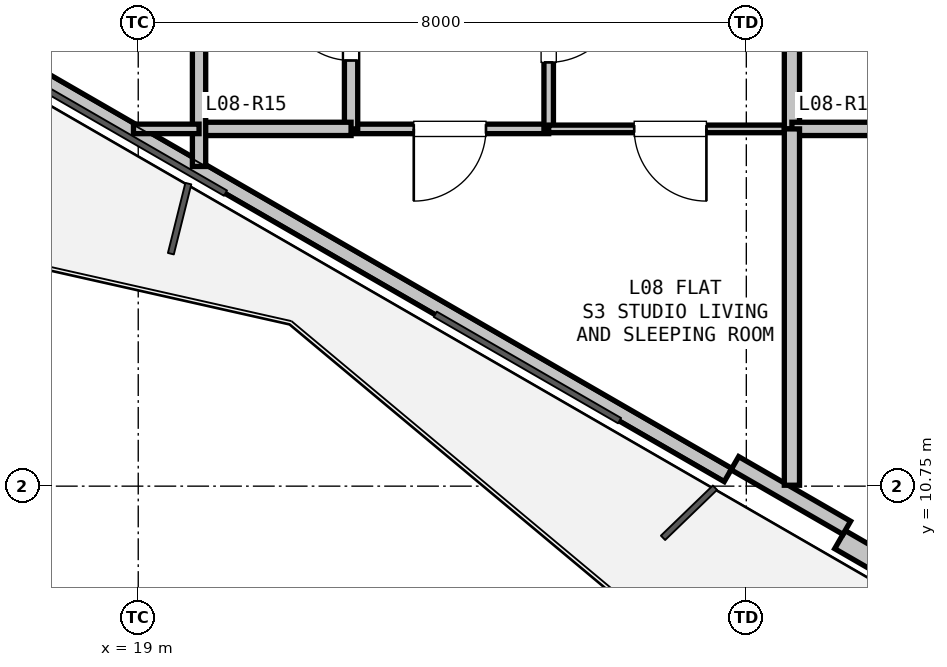
"""IFC4 building model, lengths in metres.
Left out: names, types, materials, properties, quantities, classifications, styles, units other than length and angle.
Written with IfcOpenShell. Run it as: python <this file> out.ifc"""

import sys

from ifc_helpers import new_model, si_unit, direction, frame, frame_2d, origin, place, context, subcontext, project, spatial, rectangle, extrude, element, fill, save


model = new_model("IFC4")
c1 = context("Model", 3, precision=1e-05, world=origin(), true_north=direction((0.0, 1.0)))
c2 = subcontext(c1, "Body", "Model", "MODEL_VIEW")
j1 = project(units=[si_unit("LENGTHUNIT", "METRE"), si_unit("PLANEANGLEUNIT", "RADIAN")], contexts=[c1])
p1 = place(None, origin())
s1 = spatial("IfcSite", under=j1, at=p1, CompositionType="ELEMENT")
p2 = place(p1, origin())
s2 = spatial("IfcBuilding", under=s1, at=p2, CompositionType="ELEMENT")
p3 = place(p2, frame((0.0, 0.0, 32.4)))
s3 = spatial("IfcBuildingStorey", under=s2, at=p3, CompositionType="ELEMENT", Elevation=32.4)
p4 = place(p3, frame((39.207, 3.71, 0.0), z_axis=(0.0, 0.0, 1.0), x_axis=(-0.86603192154, 0.499988710747, 0.0)))
e1 = element("IfcWall", 1, at=p4, inside=s3, PredefinedType="SOLIDWALL", context=c2, shape_type="SweptSolid", body=[
    extrude(rectangle(XDim=12.673, YDim=0.275, at=frame_2d((6.336, 0.0))), origin(), (0.0, 0.0, 1.0), 2.66),
])
p5 = place(p4, frame((8.136, 0.0, 0.0)))
e2 = element("IfcOpeningElement", 2, at=p5, cuts=e1, PredefinedType="OPENING", context=c2, shape_type="SweptSolid", body=[
    extrude(rectangle(XDim=1.1, YDim=2.1, at=frame_2d((0.55, 1.05))), frame((0.0, 0.147, 0.0), z_axis=(0.0, -1.0, 0.0), x_axis=(1.0, 0.0, 0.0)), (0.0, 0.0, 1.0), 0.295),
])
p6 = place(p4, frame((2.971, 0.0, 0.9)))
e3 = element("IfcOpeningElement", 3, at=p6, cuts=e1, PredefinedType="OPENING", context=c2, shape_type="SweptSolid", body=[
    extrude(rectangle(XDim=1.2, YDim=1.4, at=frame_2d((0.6, 0.7))), frame((0.0, 0.147, 0.0), z_axis=(0.0, -1.0, 0.0), x_axis=(1.0, 0.0, 0.0)), (0.0, 0.0, 1.0), 0.295),
])
p7 = place(p3, frame((26.76, 10.896, 0.0), z_axis=(0.0, 0.0, 1.0), x_axis=(-0.866027351828, 0.499996625875, 0.0)))
e4 = element("IfcWall", 4, at=p7, inside=s3, PredefinedType="PARAPET", context=c2, shape_type="SweptSolid", body=[
    extrude(rectangle(XDim=11.973, YDim=0.2, at=frame_2d((5.987, 0.0))), origin(), (0.0, 0.0, 1.0), 0.2),
])
p8 = place(p3, frame((28.322, 10.202, 0.0), z_axis=(0.0, 0.0, 1.0), x_axis=(-0.86605165483, 0.499954529098, 0.0)))
e5 = element("IfcWall", 5, at=p8, inside=s3, PredefinedType="PARAPET", context=c2, shape_type="SweptSolid", body=[
    extrude(rectangle(XDim=1.7, YDim=0.2, at=frame_2d((0.85, 0.0))), origin(), (0.0, 0.0, 1.0), 2.66),
])
p9 = place(p3, frame((24.4, 15.45, 0.0), z_axis=(0.0, 0.0, 1.0), x_axis=(-1.0, 0.0, 0.0)))
e6 = element("IfcWall", 6, at=p9, inside=s3, PredefinedType="PARTITIONING", context=c2, shape_type="SweptSolid", body=[
    extrude(rectangle(XDim=2.6, YDim=0.125, at=frame_2d((1.3, 0.0))), origin(), (0.0, 0.0, 1.0), 3.04),
])
p10 = place(p9, frame((0.825, 0.0, 0.0)))
e7 = element("IfcOpeningElement", 7, at=p10, cuts=e6, PredefinedType="OPENING", context=c2, shape_type="SweptSolid", body=[
    extrude(rectangle(XDim=0.95, YDim=2.1, at=frame_2d((0.475, 1.05))), frame((0.0, 0.073, 0.0), z_axis=(0.0, -1.0, 0.0), x_axis=(1.0, 0.0, 0.0)), (0.0, 0.0, 1.0), 0.145),
])
p11 = place(p3, frame((21.8, 15.45, 0.0), z_axis=(0.0, 0.0, 1.0), x_axis=(0.0, 1.0, 0.0)))
e8 = element("IfcWall", 8, at=p11, inside=s3, PredefinedType="PLUMBINGWALL", context=c2, shape_type="SweptSolid", body=[
    extrude(rectangle(XDim=2.7, YDim=0.175, at=frame_2d((1.35, 0.0))), origin(), (0.0, 0.0, 1.0), 3.04),
])
p12 = place(p11, frame((0.9, 0.0, 0.0)))
e9 = element("IfcOpeningElement", 9, at=p12, cuts=e8, PredefinedType="OPENING", context=c2, shape_type="SweptSolid", body=[
    extrude(rectangle(XDim=0.9, YDim=2.1, at=frame_2d((0.45, 1.05))), frame((0.0, 0.097, 0.0), z_axis=(0.0, -1.0, 0.0), x_axis=(1.0, 0.0, 0.0)), (0.0, 0.0, 1.0), 0.195),
])
p13 = place(p3, frame((24.4, 18.15, 0.0), z_axis=(0.0, 0.0, 1.0), x_axis=(0.0, -1.0, 0.0)))
e10 = element("IfcWall", 10, at=p13, inside=s3, PredefinedType="PARTITIONING", context=c2, shape_type="SweptSolid", body=[
    extrude(rectangle(XDim=2.7, YDim=0.125, at=frame_2d((1.35, 0.0))), origin(), (0.0, 0.0, 1.0), 2.338),
])
p14 = place(p13, frame((0.875, 0.0, 0.0)))
e11 = element("IfcOpeningElement", 11, at=p14, cuts=e10, PredefinedType="OPENING", context=c2, shape_type="SweptSolid", body=[
    extrude(rectangle(XDim=0.95, YDim=2.1, at=frame_2d((0.475, 1.05))), frame((0.0, 0.073, 0.0), z_axis=(0.0, -1.0, 0.0), x_axis=(1.0, 0.0, 0.0)), (0.0, 0.0, 1.0), 0.145),
])
p15 = place(p3, frame((21.8, 15.45, 0.0), z_axis=(0.0, 0.0, 1.0), x_axis=(-1.0, 0.0, 0.0)))
e12 = element("IfcWall", 12, at=p15, inside=s3, PredefinedType="PLUMBINGWALL", context=c2, shape_type="SweptSolid", body=[
    extrude(rectangle(XDim=2.0, YDim=0.175, at=frame_2d((1.0, 0.0))), origin(), (0.0, 0.0, 1.0), 2.365),
])
p16 = place(p3, frame((19.8, 14.956, 0.0), z_axis=(0.0, 0.0, 1.0), x_axis=(0.0, 1.0, 0.0)))
e13 = element("IfcWall", 13, at=p16, inside=s3, PredefinedType="PLUMBINGWALL", context=c2, shape_type="SweptSolid", body=[
    extrude(rectangle(XDim=3.194, YDim=0.175, at=frame_2d((1.597, 0.0))), origin(), (0.0, 0.0, 1.0), 2.365),
])
p17 = place(p3, frame((27.6, 15.45, 0.0), z_axis=(0.0, 0.0, 1.0), x_axis=(-1.0, 0.0, 0.0)))
e14 = element("IfcWall", 14, at=p17, inside=s3, PredefinedType="PARTITIONING", context=c2, shape_type="SweptSolid", body=[
    extrude(rectangle(XDim=3.2, YDim=0.1, at=frame_2d((1.6, 0.0))), origin(), (0.0, 0.0, 1.0), 2.338),
])
p18 = place(p17, frame((1.125, 0.0, 0.0)))
e15 = element("IfcOpeningElement", 15, at=p18, cuts=e14, PredefinedType="OPENING", context=c2, shape_type="SweptSolid", body=[
    extrude(rectangle(XDim=0.95, YDim=2.1, at=frame_2d((0.475, 1.05))), frame((0.0, 0.06, 0.0), z_axis=(0.0, -1.0, 0.0), x_axis=(1.0, 0.0, 0.0)), (0.0, 0.0, 1.0), 0.12),
])
p19 = place(p3, frame((27.6, 18.15, 0.0), z_axis=(0.0, 0.0, 1.0), x_axis=(0.0, -1.0, 0.0)))
e16 = element("IfcWall", 16, at=p19, inside=s3, PredefinedType="PARTITIONING", context=c2, shape_type="SweptSolid", body=[
    extrude(rectangle(XDim=2.7, YDim=0.2, at=frame_2d((1.35, 0.0))), origin(), (0.0, 0.0, 1.0), 3.04),
])
p20 = place(p3, frame((29.6, 15.45, 0.0), z_axis=(0.0, 0.0, 1.0), x_axis=(-1.0, 0.0, 0.0)))
e17 = element("IfcWall", 17, at=p20, inside=s3, PredefinedType="PLUMBINGWALL", context=c2, shape_type="SweptSolid", body=[
    extrude(rectangle(XDim=2.0, YDim=0.175, at=frame_2d((1.0, 0.0))), origin(), (0.0, 0.0, 1.0), 3.04),
])
p21 = place(p3, frame((18.938, 15.45, 0.0), z_axis=(0.0, 0.0, 1.0), x_axis=(1.0, 0.0, 0.0)))
e18 = element("IfcWall", 18, at=p21, inside=s3, PredefinedType="PARTITIONING", context=c2, shape_type="SweptSolid", body=[
    extrude(rectangle(XDim=0.863, YDim=0.125, at=frame_2d((0.431, 0.0))), origin(), (0.0, 0.0, 1.0), 2.65),
])
p22 = place(p3, frame((27.6, 15.45, 0.0), z_axis=(0.0, 0.0, 1.0), x_axis=(0.0, -1.0, 0.0)))
e19 = element("IfcWall", 19, at=p22, inside=s3, PredefinedType="PARTITIONING", context=c2, shape_type="SweptSolid", body=[
    extrude(rectangle(XDim=4.688, YDim=0.2, at=frame_2d((2.344, 0.0))), origin(), (0.0, 0.0, 1.0), 2.338),
])
p23 = place(p12, origin())
e20 = element("IfcDoor", 20, at=p23, inside=s3, OperationType="SINGLE_SWING_RIGHT", PredefinedType="DOOR", context=c2, shape_type="SweptSolid", body=[
    extrude(rectangle(XDim=0.9, YDim=2.1, at=frame_2d((0.45, 1.05))), frame((0.0, 0.025, 0.0), z_axis=(0.0, -1.0, 0.0), x_axis=(1.0, 0.0, 0.0)), (0.0, 0.0, 1.0), 0.05),
])
fill(e9, e20)
p24 = place(p14, origin())
e21 = element("IfcDoor", 21, at=p24, inside=s3, OperationType="SINGLE_SWING_LEFT", PredefinedType="DOOR", context=c2, shape_type="SweptSolid", body=[
    extrude(rectangle(XDim=0.95, YDim=2.1, at=frame_2d((0.475, 1.05))), frame((0.0, 0.025, 0.0), z_axis=(0.0, -1.0, 0.0), x_axis=(1.0, 0.0, 0.0)), (0.0, 0.0, 1.0), 0.05),
])
fill(e11, e21)
p25 = place(p10, origin())
e22 = element("IfcDoor", 22, at=p25, inside=s3, OperationType="SINGLE_SWING_RIGHT", PredefinedType="DOOR", context=c2, shape_type="SweptSolid", body=[
    extrude(rectangle(XDim=0.95, YDim=2.1, at=frame_2d((0.475, 1.05))), frame((0.0, 0.025, 0.0), z_axis=(0.0, -1.0, 0.0), x_axis=(1.0, 0.0, 0.0)), (0.0, 0.0, 1.0), 0.05),
])
fill(e7, e22)
p26 = place(p18, origin())
e23 = element("IfcDoor", 23, at=p26, inside=s3, OperationType="SINGLE_SWING_LEFT", PredefinedType="DOOR", context=c2, shape_type="SweptSolid", body=[
    extrude(rectangle(XDim=0.95, YDim=2.1, at=frame_2d((0.475, 1.05))), frame((0.0, 0.025, 0.0), z_axis=(0.0, -1.0, 0.0), x_axis=(1.0, 0.0, 0.0)), (0.0, 0.0, 1.0), 0.05),
])
fill(e15, e23)
save(model, sys.argv[1])
